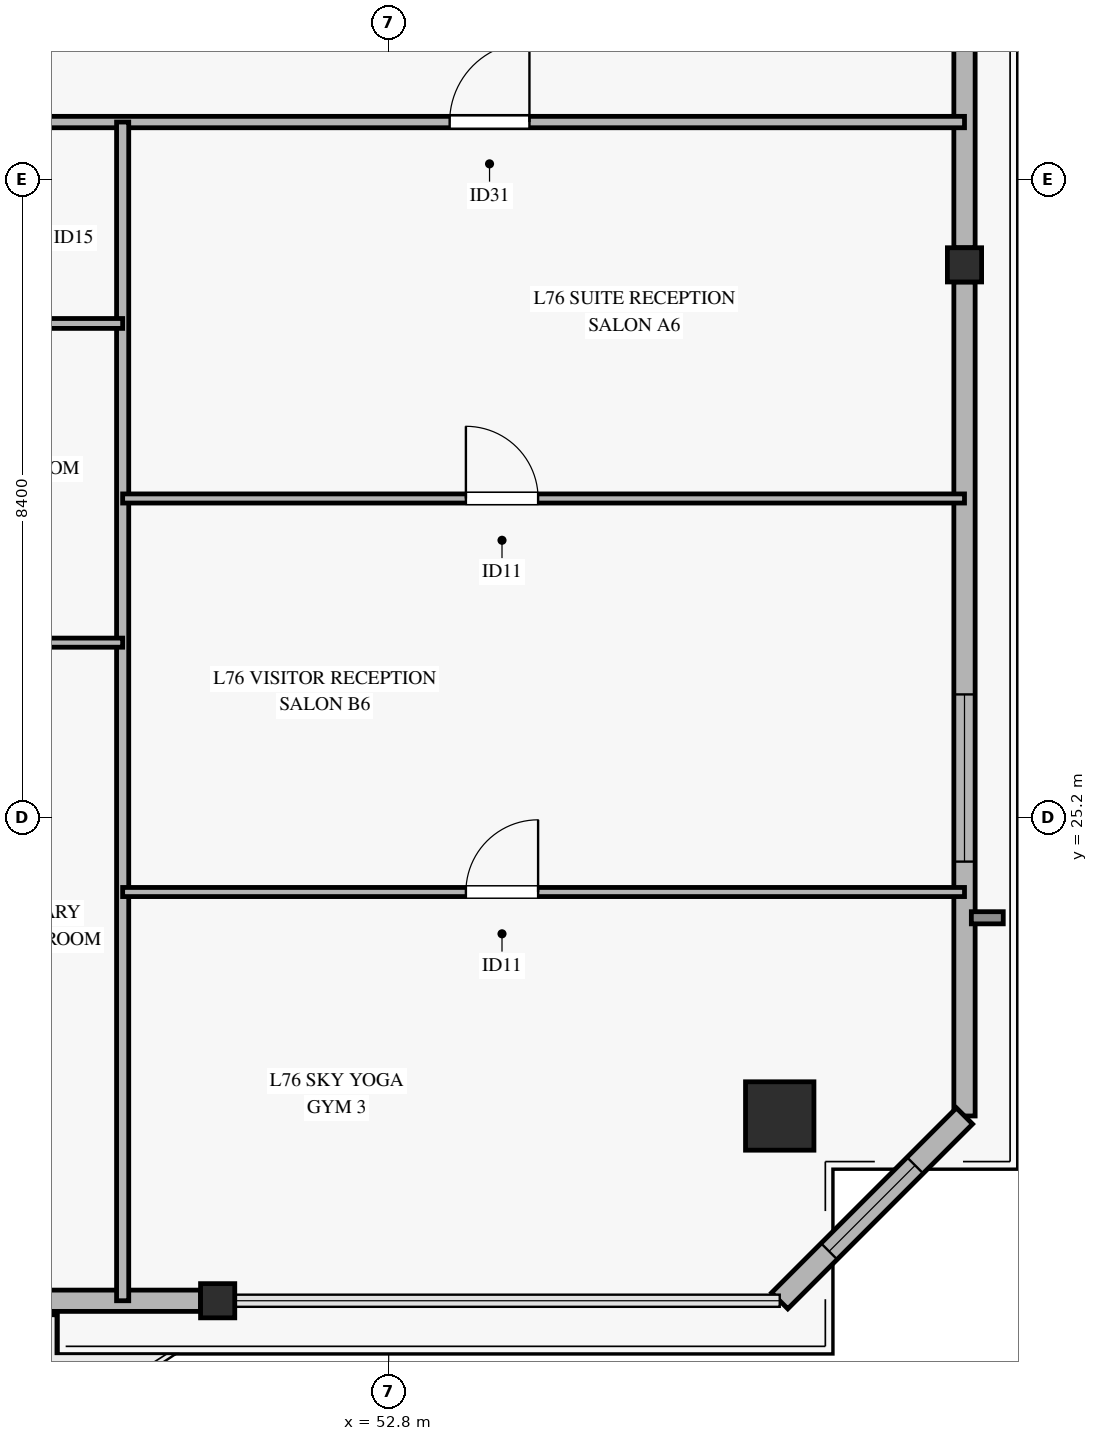
"""IFC4 building model, lengths in metres.
Left out: names, types, materials, properties, quantities, classifications, styles, units other than length and angle.
Written with IfcOpenShell. Run it as: python <this file> out.ifc"""

import sys

from ifc_helpers import new_model, si_unit, direction, frame, frame_2d, origin, origin_2d, place, context, subcontext, project, spatial, rectangle, hollow_rectangle, extrude, source, transform, mapped, element, fill, save


model = new_model("IFC4")
c1 = context("Model", 3, precision=1e-05, world=origin(), true_north=direction((0.0, 1.0)))
c2 = subcontext(c1, "Body", "Model", "MODEL_VIEW")
j1 = project(units=[si_unit("LENGTHUNIT", "METRE"), si_unit("PLANEANGLEUNIT", "RADIAN")], contexts=[c1])
p1 = place(None, origin())
s1 = spatial("IfcSite", under=j1, at=p1, CompositionType="ELEMENT")
p2 = place(p1, origin())
s2 = spatial("IfcBuilding", under=s1, at=p2, CompositionType="ELEMENT")
p3 = place(p2, frame((0.0, 0.0, 297.2)))
s3 = spatial("IfcBuildingStorey", under=s2, at=p3, CompositionType="ELEMENT", Elevation=297.2)
m1 = source(origin(), c2, "Body", "SweptSolid", [
    extrude(hollow_rectangle(XDim=0.9, YDim=0.9, WallThickness=0.04, at=origin_2d()), origin(), (0.0, 0.0, 1.0), 3.185),
])
p4 = place(p3, frame((57.945, 21.272, 0.0), z_axis=(0.0, 0.0, 1.0), x_axis=(1.0, 0.0, 0.0)))
e1 = element("IfcColumn", 1, at=p4, inside=s3, PredefinedType="COLUMN", context=c2, shape_type="MappedRepresentation", body=[
    mapped(m1, transform((0.0, 0.0, 0.0), x_axis=(1.0, 0.0, 0.0), y_axis=(0.0, 1.0, 0.0), z_axis=(0.0, 0.0, 1.0), scale=1.0)),
])
m2 = source(origin(), c2, "Body", "SweptSolid", [
    extrude(hollow_rectangle(XDim=0.45, YDim=0.45, WallThickness=0.022, at=origin_2d()), origin(), (0.0, 0.0, 1.0), 3.185),
])
for number, where, z_axis, x_axis in (
    (2, (50.55, 18.841, 0.0), (0.0, 0.0, 1.0), (1.0, 0.0, 0.0)),
    (3, (60.376, 32.471, 0.0), (0.0, 0.0, 1.0), (1.0, 0.0, 0.0)),
):
    element("IfcColumn", number, at=place(p3, frame(where, z_axis=z_axis, x_axis=x_axis)), inside=s3, PredefinedType="COLUMN", context=c2, shape_type="MappedRepresentation", body=[
        mapped(m2, transform((0.0, 0.0, 0.0), x_axis=(1.0, 0.0, 0.0), y_axis=(0.0, 1.0, 0.0), z_axis=(0.0, 0.0, 1.0), scale=1.0)),
    ])
p5 = place(p3, frame((44.525, 18.841, 0.0), z_axis=(0.0, 0.0, 1.0), x_axis=(1.0, 0.0, 0.0)))
e4 = element("IfcWall", 4, at=p5, inside=s3, PredefinedType="SOLIDWALL", context=c2, shape_type="SweptSolid", body=[
    extrude(rectangle(XDim=5.8, YDim=0.28, at=frame_2d((2.9, 0.0))), origin(), (0.0, 0.0, 1.0), 2.815),
])
p6 = place(p5, frame((1.975, 0.0, 0.0)))
e5 = element("IfcOpeningElement", 5, at=p6, cuts=e4, PredefinedType="OPENING", context=c2, shape_type="SweptSolid", body=[
    extrude(rectangle(XDim=1.8, YDim=2.25, at=frame_2d((0.9, 1.125))), frame((0.0, 0.15, 0.0), z_axis=(0.0, -1.0, 0.0), x_axis=(1.0, 0.0, 0.0)), (0.0, 0.0, 1.0), 0.3),
])
p7 = place(p3, frame((60.376, 21.272, 0.0), z_axis=(0.0, 0.0, 1.0), x_axis=(0.0, 1.0, 0.0)))
e6 = element("IfcWall", 6, at=p7, inside=s3, PredefinedType="SOLIDWALL", context=c2, shape_type="SweptSolid", body=[
    extrude(rectangle(XDim=10.974, YDim=0.28, at=frame_2d((5.487, 0.0))), origin(), (0.0, 0.0, 1.0), 2.815),
])
p8 = place(p7, frame((3.347, 0.0, 0.45)))
e7 = element("IfcOpeningElement", 7, at=p8, cuts=e6, PredefinedType="OPENING", context=c2, shape_type="SweptSolid", body=[
    extrude(rectangle(XDim=2.2, YDim=2.1, at=frame_2d((1.1, 1.05))), frame((0.0, 0.15, 0.0), z_axis=(0.0, -1.0, 0.0), x_axis=(1.0, 0.0, 0.0)), (0.0, 0.0, 1.0), 0.3),
])
p9 = place(p3, frame((60.376, 32.696, 0.0), z_axis=(0.0, 0.0, 1.0), x_axis=(0.0, 1.0, 0.0)))
e8 = element("IfcWall", 8, at=p9, inside=s3, PredefinedType="SOLIDWALL", context=c2, shape_type="SweptSolid", body=[
    extrude(rectangle(XDim=10.973, YDim=0.28, at=frame_2d((5.486, 0.0))), origin(), (0.0, 0.0, 1.0), 2.815),
])
p10 = place(p9, frame((6.488, 0.0, 0.45)))
e9 = element("IfcOpeningElement", 9, at=p10, cuts=e8, PredefinedType="OPENING", context=c2, shape_type="SweptSolid", body=[
    extrude(rectangle(XDim=2.2, YDim=2.1, at=frame_2d((1.1, 1.05))), frame((0.0, 0.15, 0.0), z_axis=(0.0, -1.0, 0.0), x_axis=(1.0, 0.0, 0.0)), (0.0, 0.0, 1.0), 0.3),
])
p11 = place(p3, frame((57.945, 18.841, 0.0), z_axis=(0.0, 0.0, 1.0), x_axis=(0.707106781187, 0.707106781187, 0.0)))
e10 = element("IfcWall", 10, at=p11, inside=s3, PredefinedType="SOLIDWALL", context=c2, shape_type="SweptSolid", body=[
    extrude(rectangle(XDim=3.438, YDim=0.3, at=frame_2d((1.719, 0.0))), origin(), (0.0, 0.0, 1.0), 2.815),
])
p12 = place(p11, frame((0.919, 0.0, 0.45)))
e11 = element("IfcOpeningElement", 11, at=p12, cuts=e10, PredefinedType="OPENING", context=c2, shape_type="SweptSolid", body=[
    extrude(rectangle(XDim=1.6, YDim=2.0, at=frame_2d((0.8, 1.0))), frame((0.0, 0.16, 0.0), z_axis=(0.0, -1.0, 0.0), x_axis=(1.0, 0.0, 0.0)), (0.0, 0.0, 1.0), 0.32),
])
p13 = place(p3, frame((10.024, 34.35, 0.0), z_axis=(0.0, 0.0, 1.0), x_axis=(1.0, 0.0, 0.0)))
e12 = element("IfcWall", 12, at=p13, inside=s3, PredefinedType="PARTITIONING", context=c2, shape_type="SweptSolid", body=[
    extrude(rectangle(XDim=50.352, YDim=0.15, at=frame_2d((25.176, 0.0))), origin(), (0.0, 0.0, 1.0), 2.47),
])
p14 = place(p13, frame((5.148, 0.0, 0.0)))
e13 = element("IfcOpeningElement", 13, at=p14, cuts=e12, PredefinedType="OPENING", context=c2, shape_type="SweptSolid", body=[
    extrude(rectangle(XDim=1.05, YDim=2.15, at=frame_2d((0.525, 1.075))), frame((0.0, 0.085, 0.0), z_axis=(0.0, -1.0, 0.0), x_axis=(1.0, 0.0, 0.0)), (0.0, 0.0, 1.0), 0.17),
])
p15 = place(p13, frame((15.651, 0.0, 0.0)))
e14 = element("IfcOpeningElement", 14, at=p15, cuts=e12, PredefinedType="OPENING", context=c2, shape_type="SweptSolid", body=[
    extrude(rectangle(XDim=1.05, YDim=2.15, at=frame_2d((0.525, 1.075))), frame((0.0, 0.085, 0.0), z_axis=(0.0, -1.0, 0.0), x_axis=(1.0, 0.0, 0.0)), (0.0, 0.0, 1.0), 0.17),
])
p16 = place(p13, frame((22.129, 0.0, 0.0)))
e15 = element("IfcOpeningElement", 15, at=p16, cuts=e12, PredefinedType="OPENING", context=c2, shape_type="SweptSolid", body=[
    extrude(rectangle(XDim=1.05, YDim=2.15, at=frame_2d((0.525, 1.075))), frame((0.0, 0.085, 0.0), z_axis=(0.0, -1.0, 0.0), x_axis=(1.0, 0.0, 0.0)), (0.0, 0.0, 1.0), 0.17),
])
p17 = place(p13, frame((29.151, 0.0, 0.0)))
e16 = element("IfcOpeningElement", 16, at=p17, cuts=e12, PredefinedType="OPENING", context=c2, shape_type="SweptSolid", body=[
    extrude(rectangle(XDim=1.05, YDim=2.15, at=frame_2d((0.525, 1.075))), frame((0.0, 0.085, 0.0), z_axis=(0.0, -1.0, 0.0), x_axis=(1.0, 0.0, 0.0)), (0.0, 0.0, 1.0), 0.17),
])
p18 = place(p13, frame((35.701, 0.0, 0.0)))
e17 = element("IfcOpeningElement", 17, at=p18, cuts=e12, PredefinedType="OPENING", context=c2, shape_type="SweptSolid", body=[
    extrude(rectangle(XDim=1.05, YDim=2.15, at=frame_2d((0.525, 1.075))), frame((0.0, 0.085, 0.0), z_axis=(0.0, -1.0, 0.0), x_axis=(1.0, 0.0, 0.0)), (0.0, 0.0, 1.0), 0.17),
])
p19 = place(p13, frame((43.578, 0.0, 0.0)))
e18 = element("IfcOpeningElement", 18, at=p19, cuts=e12, PredefinedType="OPENING", context=c2, shape_type="SweptSolid", body=[
    extrude(rectangle(XDim=1.05, YDim=2.15, at=frame_2d((0.525, 1.075))), frame((0.0, 0.085, 0.0), z_axis=(0.0, -1.0, 0.0), x_axis=(1.0, 0.0, 0.0)), (0.0, 0.0, 1.0), 0.17),
])
p20 = place(p3, frame((49.3, 18.841, 0.0), z_axis=(0.0, 0.0, 1.0), x_axis=(0.0, 1.0, 0.0)))
e19 = element("IfcWall", 19, at=p20, inside=s3, PredefinedType="PARTITIONING", context=c2, shape_type="SweptSolid", body=[
    extrude(rectangle(XDim=15.509, YDim=0.16, at=frame_2d((7.754, 0.0))), origin(), (0.0, 0.0, 1.0), 2.77),
])
p21 = place(p3, frame((47.685, 31.7, 0.0), z_axis=(0.0, 0.0, 1.0), x_axis=(1.0, 0.0, 0.0)))
e20 = element("IfcWall", 20, at=p21, inside=s3, PredefinedType="PARTITIONING", context=c2, shape_type="SweptSolid", body=[
    extrude(rectangle(XDim=1.615, YDim=0.13, at=frame_2d((0.808, 0.0))), origin(), (0.0, 0.0, 1.0), 3.185),
])
p22 = place(p3, frame((45.72, 27.5, 0.0), z_axis=(0.0, 0.0, 1.0), x_axis=(1.0, 0.0, 0.0)))
e21 = element("IfcWall", 21, at=p22, inside=s3, PredefinedType="PARTITIONING", context=c2, shape_type="SweptSolid", body=[
    extrude(rectangle(XDim=3.58, YDim=0.12, at=frame_2d((1.79, 0.0))), origin(), (0.0, 0.0, 1.0), 3.185),
])
p23 = place(p3, frame((49.3, 24.219, 0.0), z_axis=(0.0, 0.0, 1.0), x_axis=(1.0, 0.0, 0.0)))
e22 = element("IfcWall", 22, at=p23, inside=s3, PredefinedType="PARTITIONING", context=c2, shape_type="SweptSolid", body=[
    extrude(rectangle(XDim=11.076, YDim=0.12, at=frame_2d((5.538, 0.0))), origin(), (0.0, 0.0, 1.0), 2.47),
])
p24 = place(p23, frame((4.516, 0.0, 0.0)))
e23 = element("IfcOpeningElement", 23, at=p24, cuts=e22, PredefinedType="OPENING", context=c2, shape_type="SweptSolid", body=[
    extrude(rectangle(XDim=0.95, YDim=2.1, at=frame_2d((0.475, 1.05))), frame((0.0, 0.07, 0.0), z_axis=(0.0, -1.0, 0.0), x_axis=(1.0, 0.0, 0.0)), (0.0, 0.0, 1.0), 0.14),
])
p25 = place(p3, frame((49.3, 29.397, 0.0), z_axis=(0.0, 0.0, 1.0), x_axis=(1.0, 0.0, 0.0)))
e24 = element("IfcWall", 24, at=p25, inside=s3, PredefinedType="PARTITIONING", context=c2, shape_type="SweptSolid", body=[
    extrude(rectangle(XDim=11.076, YDim=0.12, at=frame_2d((5.538, 0.0))), origin(), (0.0, 0.0, 1.0), 2.47),
])
p26 = place(p25, frame((4.516, 0.0, 0.0)))
e25 = element("IfcOpeningElement", 25, at=p26, cuts=e24, PredefinedType="OPENING", context=c2, shape_type="SweptSolid", body=[
    extrude(rectangle(XDim=0.95, YDim=2.1, at=frame_2d((0.475, 1.05))), frame((0.0, 0.07, 0.0), z_axis=(0.0, -1.0, 0.0), x_axis=(1.0, 0.0, 0.0)), (0.0, 0.0, 1.0), 0.14),
])
m3 = source(origin(), c2, "Body", "SweptSolid", [
    extrude(rectangle(XDim=2.2, YDim=2.1, at=frame_2d((1.1, 1.05))), frame((0.0, 0.03, 0.0), z_axis=(0.0, -1.0, 0.0), x_axis=(1.0, 0.0, 0.0)), (0.0, 0.0, 1.0), 0.06),
])
p27 = place(p8, origin())
e26 = element("IfcWindow", 26, at=p27, inside=s3, PartitioningType="SINGLE_PANEL", PredefinedType="WINDOW", context=c2, shape_type="MappedRepresentation", body=[
    mapped(m3, transform((0.0, 0.0, 0.0), x_axis=(1.0, 0.0, 0.0), y_axis=(0.0, 1.0, 0.0), z_axis=(0.0, 0.0, 1.0), scale=1.0)),
])
fill(e7, e26)
m4 = source(origin(), c2, "Body", "SweptSolid", [
    extrude(rectangle(XDim=1.6, YDim=2.0, at=frame_2d((0.8, 1.0))), frame((0.0, 0.03, 0.0), z_axis=(0.0, -1.0, 0.0), x_axis=(1.0, 0.0, 0.0)), (0.0, 0.0, 1.0), 0.06),
])
p28 = place(p12, origin())
e27 = element("IfcWindow", 27, at=p28, inside=s3, PartitioningType="SINGLE_PANEL", PredefinedType="WINDOW", context=c2, shape_type="MappedRepresentation", body=[
    mapped(m4, transform((0.0, 0.0, 0.0), x_axis=(1.0, 0.0, 0.0), y_axis=(0.0, 1.0, 0.0), z_axis=(0.0, 0.0, 1.0), scale=1.0)),
])
fill(e11, e27)
m5 = source(origin(), c2, "Body", "SweptSolid", [
    extrude(rectangle(XDim=1.05, YDim=2.15, at=frame_2d((0.525, 1.075))), frame((0.0, 0.025, 0.0), z_axis=(0.0, -1.0, 0.0), x_axis=(1.0, 0.0, 0.0)), (0.0, 0.0, 1.0), 0.05),
])
p29 = place(p19, origin())
e28 = element("IfcDoor", 28, at=p29, inside=s3, OperationType="SINGLE_SWING_RIGHT", PredefinedType="DOOR", context=c2, shape_type="MappedRepresentation", body=[
    mapped(m5, transform((0.0, 0.0, 0.0), x_axis=(1.0, 0.0, 0.0), y_axis=(0.0, 1.0, 0.0), z_axis=(0.0, 0.0, 1.0), scale=1.0)),
])
fill(e18, e28)
m6 = source(origin(), c2, "Body", "SweptSolid", [
    extrude(rectangle(XDim=0.95, YDim=2.1, at=frame_2d((0.475, 1.05))), frame((0.0, 0.025, 0.0), z_axis=(0.0, -1.0, 0.0), x_axis=(1.0, 0.0, 0.0)), (0.0, 0.0, 1.0), 0.05),
])
p30 = place(p26, origin())
e29 = element("IfcDoor", 29, at=p30, inside=s3, OperationType="SINGLE_SWING_LEFT", PredefinedType="DOOR", context=c2, shape_type="MappedRepresentation", body=[
    mapped(m6, transform((0.0, 0.0, 0.0), x_axis=(1.0, 0.0, 0.0), y_axis=(0.0, 1.0, 0.0), z_axis=(0.0, 0.0, 1.0), scale=1.0)),
])
fill(e25, e29)
p31 = place(p24, origin())
e30 = element("IfcDoor", 30, at=p31, inside=s3, OperationType="SINGLE_SWING_RIGHT", PredefinedType="DOOR", context=c2, shape_type="MappedRepresentation", body=[
    mapped(m6, transform((0.0, 0.0, 0.0), x_axis=(1.0, 0.0, 0.0), y_axis=(0.0, 1.0, 0.0), z_axis=(0.0, 0.0, 1.0), scale=1.0)),
])
fill(e23, e30)
save(model, sys.argv[1])
